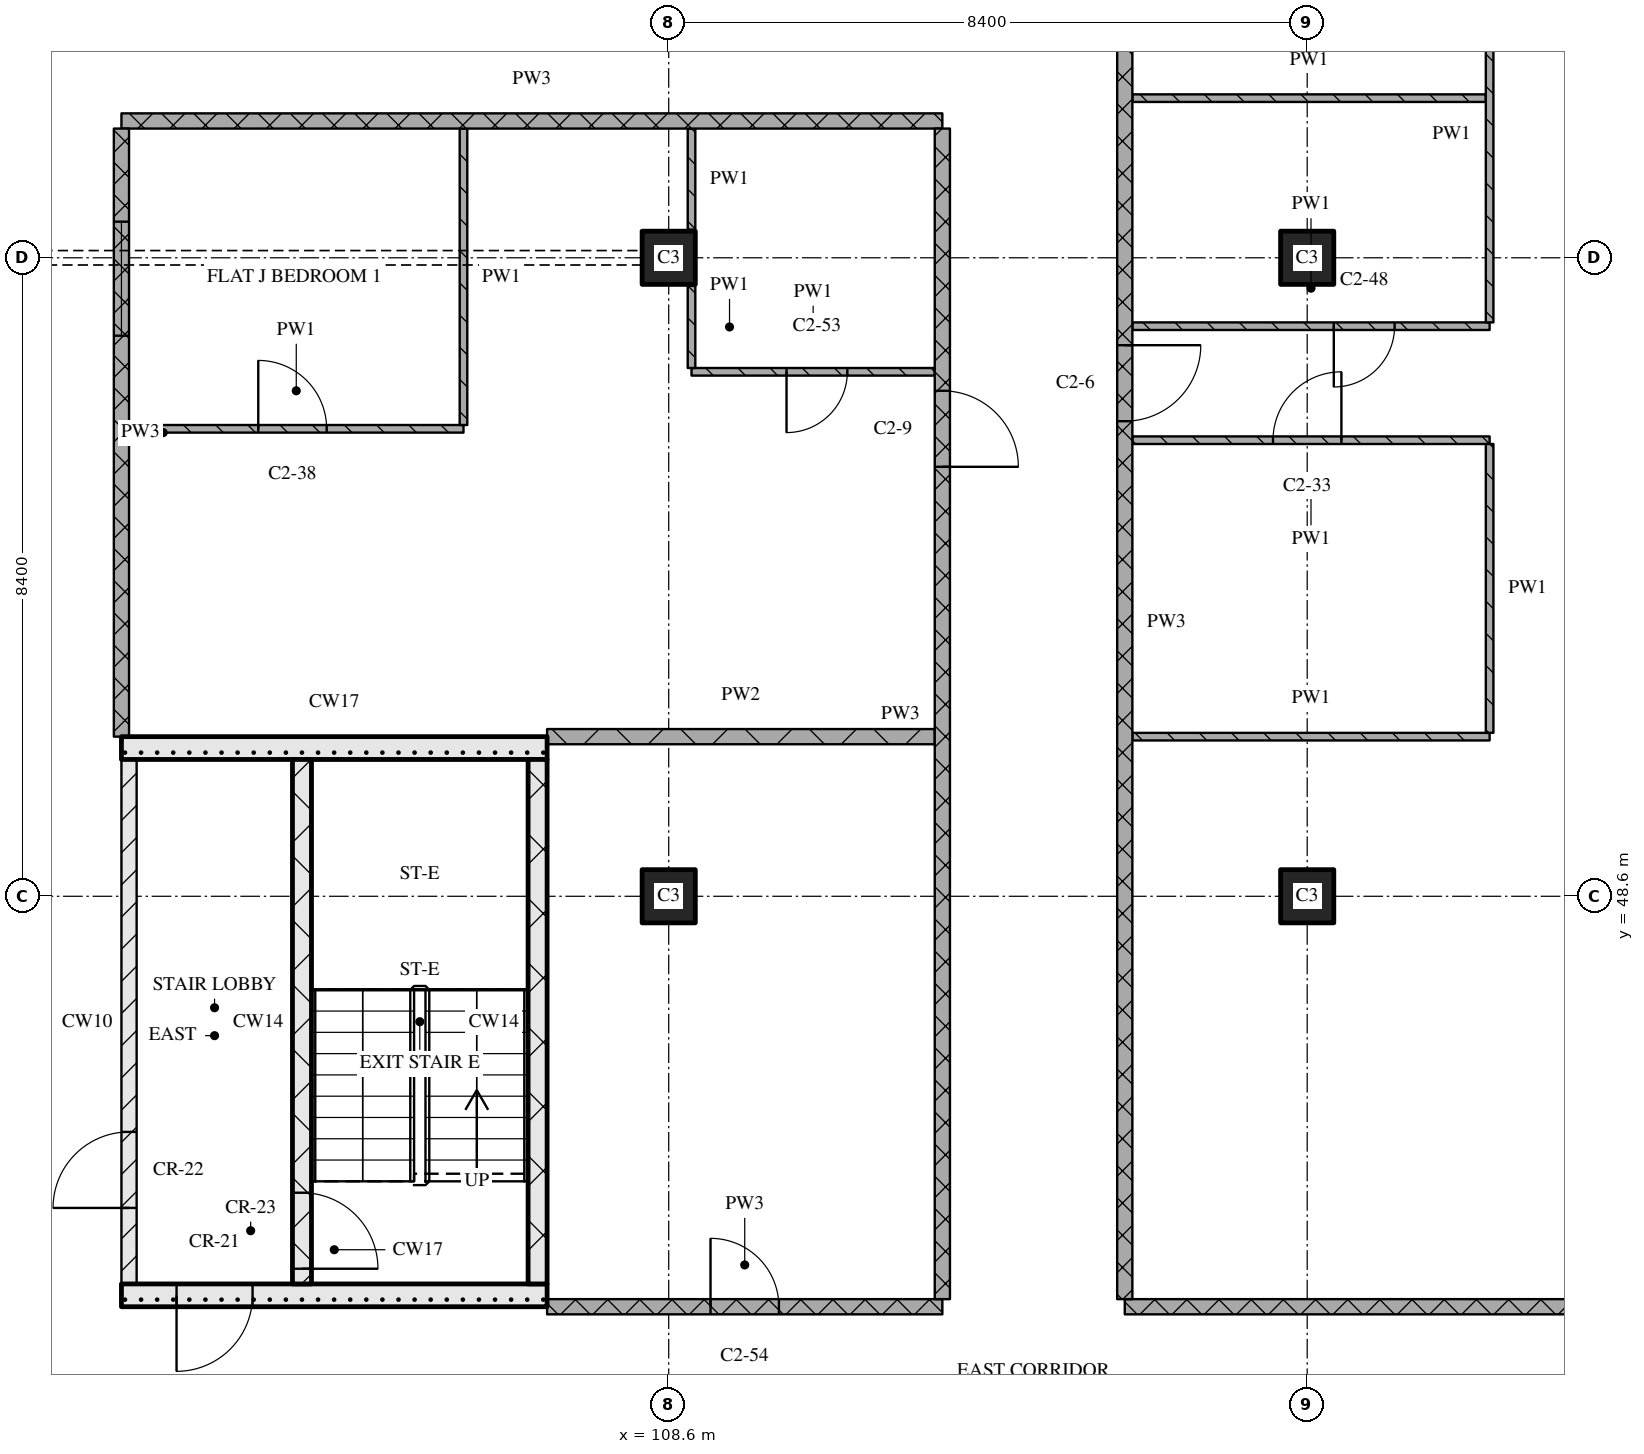
"""IFC4 building model, lengths in metres.
Left out: names, types, materials, properties, quantities, classifications, styles, units other than length and angle.
Written with IfcOpenShell. Run it as: python <this file> out.ifc"""

import sys

from ifc_helpers import new_model, si_unit, direction, frame, frame_2d, origin, origin_2d, place, context, subcontext, project, spatial, rectangle, extrude, element, fill, save


model = new_model("IFC4")
c1 = context("Model", 3, precision=1e-05, world=origin(), true_north=direction((0.0, 1.0)))
c2 = subcontext(c1, "Body", "Model", "MODEL_VIEW")
j1 = project(units=[si_unit("LENGTHUNIT", "METRE"), si_unit("PLANEANGLEUNIT", "RADIAN")], contexts=[c1])
p1 = place(None, origin())
s1 = spatial("IfcSite", under=j1, at=p1, CompositionType="ELEMENT")
p2 = place(p1, origin())
s2 = spatial("IfcBuilding", under=s1, at=p2, CompositionType="ELEMENT")
p3 = place(p2, frame((0.0, 0.0, 165.45)))
s3 = spatial("IfcBuildingStorey", under=s2, at=p3, CompositionType="ELEMENT", Elevation=165.45)
for number, where, z_axis, x_axis in (
    (1, (108.6, 48.6, 0.0), (0.0, 0.0, 1.0), (1.0, 0.0, 0.0)),
    (2, (108.6, 57.0, 0.0), (0.0, 0.0, 1.0), (1.0, 0.0, 0.0)),
    (3, (117.0, 48.6, 0.0), (0.0, 0.0, 1.0), (1.0, 0.0, 0.0)),
    (4, (117.0, 57.0, 0.0), (0.0, 0.0, 1.0), (1.0, 0.0, 0.0)),
):
    element("IfcColumn", number, at=place(p3, frame(where, z_axis=z_axis, x_axis=x_axis)), inside=s3, PredefinedType="COLUMN", context=c2, shape_type="SweptSolid", body=[
        extrude(rectangle(XDim=0.7, YDim=0.7, at=origin_2d()), origin(), (0.0, 0.0, 1.0), 3.6),
    ])
p4 = place(p3, frame((101.4, 43.35, 0.0), z_axis=(0.0, 0.0, 1.0), x_axis=(1.0, 0.0, 0.0)))
e5 = element("IfcWall", 5, at=p4, inside=s3, PredefinedType="SOLIDWALL", context=c2, shape_type="SweptSolid", body=[
    extrude(rectangle(XDim=5.6, YDim=0.3, at=frame_2d((2.8, 0.0))), origin(), (0.0, 0.0, 1.0), 3.32),
])
p5 = place(p4, frame((0.725, 0.0, 0.0)))
e6 = element("IfcOpeningElement", 6, at=p5, cuts=e5, PredefinedType="OPENING", context=c2, shape_type="SweptSolid", body=[
    extrude(rectangle(XDim=1.0, YDim=2.1, at=frame_2d((0.5, 1.05))), frame((0.0, 0.16, 0.0), z_axis=(0.0, -1.0, 0.0), x_axis=(1.0, 0.0, 0.0)), (0.0, 0.0, 1.0), 0.32),
])
p6 = place(p3, frame((101.5, 43.5, 0.0), z_axis=(0.0, 0.0, 1.0), x_axis=(0.0, 1.0, 0.0)))
e7 = element("IfcWall", 7, at=p6, inside=s3, PredefinedType="PARTITIONING", context=c2, shape_type="SweptSolid", body=[
    extrude(rectangle(XDim=6.9, YDim=0.2, at=frame_2d((3.45, 0.0))), origin(), (0.0, 0.0, 1.0), 3.32),
])
p7 = place(p6, frame((1.0, 0.0, 0.0)))
e8 = element("IfcOpeningElement", 8, at=p7, cuts=e7, PredefinedType="OPENING", context=c2, shape_type="SweptSolid", body=[
    extrude(rectangle(XDim=1.0, YDim=2.1, at=frame_2d((0.5, 1.05))), frame((0.0, 0.11, 0.0), z_axis=(0.0, -1.0, 0.0), x_axis=(1.0, 0.0, 0.0)), (0.0, 0.0, 1.0), 0.22),
])
p8 = place(p3, frame((103.775, 43.5, 0.0), z_axis=(0.0, 0.0, 1.0), x_axis=(0.0, 1.0, 0.0)))
e9 = element("IfcWall", 9, at=p8, inside=s3, PredefinedType="SOLIDWALL", context=c2, shape_type="SweptSolid", body=[
    extrude(rectangle(XDim=6.9, YDim=0.25, at=frame_2d((3.45, 0.0))), origin(), (0.0, 0.0, 1.0), 3.32),
])
p9 = place(p8, frame((0.2, 0.0, 0.0)))
e10 = element("IfcOpeningElement", 10, at=p9, cuts=e9, PredefinedType="OPENING", context=c2, shape_type="SweptSolid", body=[
    extrude(rectangle(XDim=1.0, YDim=2.1, at=frame_2d((0.5, 1.05))), frame((0.0, 0.135, 0.0), z_axis=(0.0, -1.0, 0.0), x_axis=(1.0, 0.0, 0.0)), (0.0, 0.0, 1.0), 0.27),
])
p10 = place(p3, frame((106.875, 43.5, 0.0), z_axis=(0.0, 0.0, 1.0), x_axis=(0.0, 1.0, 0.0)))
e11 = element("IfcWall", 11, at=p10, inside=s3, PredefinedType="SOLIDWALL", context=c2, shape_type="SweptSolid", body=[
    extrude(rectangle(XDim=6.9, YDim=0.25, at=frame_2d((3.45, 0.0))), origin(), (0.0, 0.0, 1.0), 3.32),
])
p11 = place(p3, frame((101.4, 50.55, 0.0), z_axis=(0.0, 0.0, 1.0), x_axis=(1.0, 0.0, 0.0)))
e12 = element("IfcWall", 12, at=p11, inside=s3, PredefinedType="SOLIDWALL", context=c2, shape_type="SweptSolid", body=[
    extrude(rectangle(XDim=5.6, YDim=0.3, at=frame_2d((2.8, 0.0))), origin(), (0.0, 0.0, 1.0), 3.32),
])
p12 = place(p3, frame((107.0, 43.2, 0.0), z_axis=(0.0, 0.0, 1.0), x_axis=(1.0, 0.0, 0.0)))
e13 = element("IfcWall", 13, at=p12, inside=s3, PredefinedType="PARTITIONING", context=c2, shape_type="SweptSolid", body=[
    extrude(rectangle(XDim=5.2, YDim=0.2, at=frame_2d((2.6, 0.0))), origin(), (0.0, 0.0, 1.0), 3.32),
])
p13 = place(p12, frame((2.15, 0.0, 0.0)))
e14 = element("IfcOpeningElement", 14, at=p13, cuts=e13, PredefinedType="OPENING", context=c2, shape_type="SweptSolid", body=[
    extrude(rectangle(XDim=0.9, YDim=2.1, at=frame_2d((0.45, 1.05))), frame((0.0, 0.11, 0.0), z_axis=(0.0, -1.0, 0.0), x_axis=(1.0, 0.0, 0.0)), (0.0, 0.0, 1.0), 0.22),
])
p14 = place(p3, frame((114.6, 43.2, 0.0), z_axis=(0.0, 0.0, 1.0), x_axis=(1.0, 0.0, 0.0)))
e15 = element("IfcWall", 15, at=p14, inside=s3, PredefinedType="PARTITIONING", context=c2, shape_type="SweptSolid", body=[
    extrude(rectangle(XDim=12.32, YDim=0.2, at=frame_2d((6.16, 0.0))), origin(), (0.0, 0.0, 1.0), 3.32),
])
p15 = place(p3, frame((107.0, 50.7, 0.0), z_axis=(0.0, 0.0, 1.0), x_axis=(1.0, 0.0, 0.0)))
e16 = element("IfcWall", 16, at=p15, inside=s3, PredefinedType="PARTITIONING", context=c2, shape_type="SweptSolid", body=[
    extrude(rectangle(XDim=5.1, YDim=0.2, at=frame_2d((2.55, 0.0))), origin(), (0.0, 0.0, 1.0), 3.32),
])
p16 = place(p3, frame((114.7, 50.7, 0.0), z_axis=(0.0, 0.0, 1.0), x_axis=(1.0, 0.0, 0.0)))
e17 = element("IfcWall", 17, at=p16, inside=s3, PredefinedType="PARTITIONING", context=c2, shape_type="SweptSolid", body=[
    extrude(rectangle(XDim=4.7, YDim=0.1, at=frame_2d((2.35, 0.0))), origin(), (0.0, 0.0, 1.0), 3.32),
])
p17 = place(p3, frame((119.4, 54.6, 0.0), z_axis=(0.0, 0.0, 1.0), x_axis=(-1.0, 0.0, 0.0)))
e18 = element("IfcWall", 18, at=p17, inside=s3, PredefinedType="PARTITIONING", context=c2, shape_type="SweptSolid", body=[
    extrude(rectangle(XDim=4.7, YDim=0.1, at=frame_2d((2.35, 0.0))), origin(), (0.0, 0.0, 1.0), 3.32),
])
p18 = place(p17, frame((1.95, 0.0, 0.0)))
e19 = element("IfcOpeningElement", 19, at=p18, cuts=e18, PredefinedType="OPENING", context=c2, shape_type="SweptSolid", body=[
    extrude(rectangle(XDim=0.9, YDim=2.1, at=frame_2d((0.45, 1.05))), frame((0.0, 0.06, 0.0), z_axis=(0.0, -1.0, 0.0), x_axis=(1.0, 0.0, 0.0)), (0.0, 0.0, 1.0), 0.12),
])
p19 = place(p3, frame((101.5, 54.75, 0.0), z_axis=(0.0, 0.0, 1.0), x_axis=(1.0, 0.0, 0.0)))
e20 = element("IfcWall", 20, at=p19, inside=s3, PredefinedType="PARTITIONING", context=c2, shape_type="SweptSolid", body=[
    extrude(rectangle(XDim=4.4, YDim=0.1, at=frame_2d((2.2, 0.0))), origin(), (0.0, 0.0, 1.0), 3.32),
])
p20 = place(p19, frame((1.7, 0.0, 0.0)))
e21 = element("IfcOpeningElement", 21, at=p20, cuts=e20, PredefinedType="OPENING", context=c2, shape_type="SweptSolid", body=[
    extrude(rectangle(XDim=0.9, YDim=2.1, at=frame_2d((0.45, 1.05))), frame((0.0, 0.06, 0.0), z_axis=(0.0, -1.0, 0.0), x_axis=(1.0, 0.0, 0.0)), (0.0, 0.0, 1.0), 0.12),
])
p21 = place(p3, frame((108.9, 55.5, 0.0), z_axis=(0.0, 0.0, 1.0), x_axis=(1.0, 0.0, 0.0)))
e22 = element("IfcWall", 22, at=p21, inside=s3, PredefinedType="PARTITIONING", context=c2, shape_type="SweptSolid", body=[
    extrude(rectangle(XDim=3.2, YDim=0.1, at=frame_2d((1.6, 0.0))), origin(), (0.0, 0.0, 1.0), 3.32),
])
p22 = place(p21, frame((1.25, 0.0, 0.0)))
e23 = element("IfcOpeningElement", 23, at=p22, cuts=e22, PredefinedType="OPENING", context=c2, shape_type="SweptSolid", body=[
    extrude(rectangle(XDim=0.8, YDim=2.1, at=frame_2d((0.4, 1.05))), frame((0.0, 0.06, 0.0), z_axis=(0.0, -1.0, 0.0), x_axis=(1.0, 0.0, 0.0)), (0.0, 0.0, 1.0), 0.12),
])
p23 = place(p3, frame((114.7, 56.1, 0.0), z_axis=(0.0, 0.0, 1.0), x_axis=(1.0, 0.0, 0.0)))
e24 = element("IfcWall", 24, at=p23, inside=s3, PredefinedType="PARTITIONING", context=c2, shape_type="SweptSolid", body=[
    extrude(rectangle(XDim=4.7, YDim=0.1, at=frame_2d((2.35, 0.0))), origin(), (0.0, 0.0, 1.0), 3.32),
])
p24 = place(p23, frame((2.65, 0.0, 0.0)))
e25 = element("IfcOpeningElement", 25, at=p24, cuts=e24, PredefinedType="OPENING", context=c2, shape_type="SweptSolid", body=[
    extrude(rectangle(XDim=0.8, YDim=2.1, at=frame_2d((0.4, 1.05))), frame((0.0, 0.06, 0.0), z_axis=(0.0, -1.0, 0.0), x_axis=(1.0, 0.0, 0.0)), (0.0, 0.0, 1.0), 0.12),
])
p25 = place(p3, frame((101.4, 58.8, 0.0), z_axis=(0.0, 0.0, 1.0), x_axis=(1.0, 0.0, 0.0)))
e26 = element("IfcWall", 26, at=p25, inside=s3, PredefinedType="PARTITIONING", context=c2, shape_type="SweptSolid", body=[
    extrude(rectangle(XDim=10.8, YDim=0.2, at=frame_2d((5.4, 0.0))), origin(), (0.0, 0.0, 1.0), 3.32),
])
p26 = place(p3, frame((114.7, 59.1, 0.0), z_axis=(0.0, 0.0, 1.0), x_axis=(1.0, 0.0, 0.0)))
e27 = element("IfcWall", 27, at=p26, inside=s3, PredefinedType="PARTITIONING", context=c2, shape_type="SweptSolid", body=[
    extrude(rectangle(XDim=4.65, YDim=0.1, at=frame_2d((2.325, 0.0))), origin(), (0.0, 0.0, 1.0), 3.32),
])
p27 = place(p3, frame((101.4, 58.7, 0.0), z_axis=(0.0, 0.0, 1.0), x_axis=(0.0, -1.0, 0.0)))
e28 = element("IfcWall", 28, at=p27, inside=s3, PredefinedType="PARTITIONING", context=c2, shape_type="SweptSolid", body=[
    extrude(rectangle(XDim=8.0, YDim=0.2, at=frame_2d((4.0, 0.0))), origin(), (0.0, 0.0, 1.0), 3.32),
])
p28 = place(p27, frame((1.225, 0.0, 0.9)))
e29 = element("IfcOpeningElement", 29, at=p28, cuts=e28, PredefinedType="OPENING", context=c2, shape_type="SweptSolid", body=[
    extrude(rectangle(XDim=1.5, YDim=1.5, at=frame_2d((0.75, 0.75))), frame((0.0, 0.11, 0.0), z_axis=(0.0, -1.0, 0.0), x_axis=(1.0, 0.0, 0.0)), (0.0, 0.0, 1.0), 0.22),
])
p29 = place(p3, frame((105.9, 58.7, 0.0), z_axis=(0.0, 0.0, 1.0), x_axis=(0.0, -1.0, 0.0)))
e30 = element("IfcWall", 30, at=p29, inside=s3, PredefinedType="PARTITIONING", context=c2, shape_type="SweptSolid", body=[
    extrude(rectangle(XDim=3.9, YDim=0.1, at=frame_2d((1.95, 0.0))), origin(), (0.0, 0.0, 1.0), 3.32),
])
p30 = place(p3, frame((108.9, 56.63, 0.0), z_axis=(0.0, 0.0, 1.0), x_axis=(0.0, -1.0, 0.0)))
e31 = element("IfcWall", 31, at=p30, inside=s3, PredefinedType="PARTITIONING", context=c2, shape_type="SweptSolid", body=[
    extrude(rectangle(XDim=1.08, YDim=0.1, at=frame_2d((0.54, 0.0))), origin(), (0.0, 0.0, 1.0), 3.32),
])
p31 = place(p3, frame((108.9, 58.7, 0.0), z_axis=(0.0, 0.0, 1.0), x_axis=(0.0, -1.0, 0.0)))
e32 = element("IfcWall", 32, at=p31, inside=s3, PredefinedType="PARTITIONING", context=c2, shape_type="SweptSolid", body=[
    extrude(rectangle(XDim=1.33, YDim=0.1, at=frame_2d((0.665, 0.0))), origin(), (0.0, 0.0, 1.0), 3.32),
])
p32 = place(p3, frame((112.2, 43.3, 0.0), z_axis=(0.0, 0.0, 1.0), x_axis=(0.0, 1.0, 0.0)))
e33 = element("IfcWall", 33, at=p32, inside=s3, PredefinedType="PARTITIONING", context=c2, shape_type="SweptSolid", body=[
    extrude(rectangle(XDim=15.4, YDim=0.2, at=frame_2d((7.7, 0.0))), origin(), (0.0, 0.0, 1.0), 3.32),
])
p33 = place(p32, frame((10.95, 0.0, 0.0)))
e34 = element("IfcOpeningElement", 34, at=p33, cuts=e33, PredefinedType="OPENING", context=c2, shape_type="SweptSolid", body=[
    extrude(rectangle(XDim=1.0, YDim=2.1, at=frame_2d((0.5, 1.05))), frame((0.0, 0.11, 0.0), z_axis=(0.0, -1.0, 0.0), x_axis=(1.0, 0.0, 0.0)), (0.0, 0.0, 1.0), 0.22),
])
p34 = place(p3, frame((114.6, 61.1, 0.0), z_axis=(0.0, 0.0, 1.0), x_axis=(0.0, -1.0, 0.0)))
e35 = element("IfcWall", 35, at=p34, inside=s3, PredefinedType="PARTITIONING", context=c2, shape_type="SweptSolid", body=[
    extrude(rectangle(XDim=17.8, YDim=0.2, at=frame_2d((8.9, 0.0))), origin(), (0.0, 0.0, 1.0), 3.32),
])
p35 = place(p34, frame((5.25, 0.0, 0.0)))
e36 = element("IfcOpeningElement", 36, at=p35, cuts=e35, PredefinedType="OPENING", context=c2, shape_type="SweptSolid", body=[
    extrude(rectangle(XDim=1.0, YDim=2.1, at=frame_2d((0.5, 1.05))), frame((0.0, 0.11, 0.0), z_axis=(0.0, -1.0, 0.0), x_axis=(1.0, 0.0, 0.0)), (0.0, 0.0, 1.0), 0.22),
])
p36 = place(p3, frame((119.4, 54.55, 0.0), z_axis=(0.0, 0.0, 1.0), x_axis=(0.0, -1.0, 0.0)))
e37 = element("IfcWall", 37, at=p36, inside=s3, PredefinedType="PARTITIONING", context=c2, shape_type="SweptSolid", body=[
    extrude(rectangle(XDim=3.8, YDim=0.1, at=frame_2d((1.9, 0.0))), origin(), (0.0, 0.0, 1.0), 3.32),
])
p37 = place(p3, frame((119.4, 56.15, 0.0), z_axis=(0.0, 0.0, 1.0), x_axis=(0.0, 1.0, 0.0)))
e38 = element("IfcWall", 38, at=p37, inside=s3, PredefinedType="PARTITIONING", context=c2, shape_type="SweptSolid", body=[
    extrude(rectangle(XDim=4.95, YDim=0.1, at=frame_2d((2.475, 0.0))), origin(), (0.0, 0.0, 1.0), 3.32),
])
p38 = place(p37, frame((3.6, 0.0, 0.0)))
e39 = element("IfcOpeningElement", 39, at=p38, cuts=e38, PredefinedType="OPENING", context=c2, shape_type="SweptSolid", body=[
    extrude(rectangle(XDim=0.8, YDim=2.1, at=frame_2d((0.4, 1.05))), frame((0.0, 0.06, 0.0), z_axis=(0.0, -1.0, 0.0), x_axis=(1.0, 0.0, 0.0)), (0.0, 0.0, 1.0), 0.12),
])
p39 = place(p5, origin())
e40 = element("IfcDoor", 40, at=p39, inside=s3, OperationType="SINGLE_SWING_RIGHT", PredefinedType="DOOR", context=c2, shape_type="SweptSolid", body=[
    extrude(rectangle(XDim=1.0, YDim=2.1, at=frame_2d((0.5, 1.05))), frame((0.0, 0.025, 0.0), z_axis=(0.0, -1.0, 0.0), x_axis=(1.0, 0.0, 0.0)), (0.0, 0.0, 1.0), 0.05),
])
fill(e6, e40)
p40 = place(p9, origin())
e41 = element("IfcDoor", 41, at=p40, inside=s3, OperationType="SINGLE_SWING_RIGHT", PredefinedType="DOOR", context=c2, shape_type="SweptSolid", body=[
    extrude(rectangle(XDim=1.0, YDim=2.1, at=frame_2d((0.5, 1.05))), frame((0.0, 0.025, 0.0), z_axis=(0.0, -1.0, 0.0), x_axis=(1.0, 0.0, 0.0)), (0.0, 0.0, 1.0), 0.05),
])
fill(e10, e41)
p41 = place(p7, origin())
e42 = element("IfcDoor", 42, at=p41, inside=s3, OperationType="SINGLE_SWING_LEFT", PredefinedType="DOOR", context=c2, shape_type="SweptSolid", body=[
    extrude(rectangle(XDim=1.0, YDim=2.1, at=frame_2d((0.5, 1.05))), frame((0.0, 0.025, 0.0), z_axis=(0.0, -1.0, 0.0), x_axis=(1.0, 0.0, 0.0)), (0.0, 0.0, 1.0), 0.05),
])
fill(e8, e42)
p42 = place(p13, origin())
e43 = element("IfcDoor", 43, at=p42, inside=s3, OperationType="SINGLE_SWING_LEFT", PredefinedType="DOOR", context=c2, shape_type="SweptSolid", body=[
    extrude(rectangle(XDim=0.9, YDim=2.1, at=frame_2d((0.45, 1.05))), frame((0.0, 0.025, 0.0), z_axis=(0.0, -1.0, 0.0), x_axis=(1.0, 0.0, 0.0)), (0.0, 0.0, 1.0), 0.05),
])
fill(e14, e43)
p43 = place(p18, origin())
e44 = element("IfcDoor", 44, at=p43, inside=s3, OperationType="SINGLE_SWING_RIGHT", PredefinedType="DOOR", context=c2, shape_type="SweptSolid", body=[
    extrude(rectangle(XDim=0.9, YDim=2.1, at=frame_2d((0.45, 1.05))), frame((0.0, 0.025, 0.0), z_axis=(0.0, -1.0, 0.0), x_axis=(1.0, 0.0, 0.0)), (0.0, 0.0, 1.0), 0.05),
])
fill(e19, e44)
p44 = place(p20, origin())
e45 = element("IfcDoor", 45, at=p44, inside=s3, OperationType="SINGLE_SWING_LEFT", PredefinedType="DOOR", context=c2, shape_type="SweptSolid", body=[
    extrude(rectangle(XDim=0.9, YDim=2.1, at=frame_2d((0.45, 1.05))), frame((0.0, 0.025, 0.0), z_axis=(0.0, -1.0, 0.0), x_axis=(1.0, 0.0, 0.0)), (0.0, 0.0, 1.0), 0.05),
])
fill(e21, e45)
p45 = place(p22, origin())
e46 = element("IfcDoor", 46, at=p45, inside=s3, OperationType="SINGLE_SWING_RIGHT", PredefinedType="DOOR", context=c2, shape_type="SweptSolid", body=[
    extrude(rectangle(XDim=0.8, YDim=2.1, at=frame_2d((0.4, 1.05))), frame((0.0, 0.025, 0.0), z_axis=(0.0, -1.0, 0.0), x_axis=(1.0, 0.0, 0.0)), (0.0, 0.0, 1.0), 0.05),
])
fill(e23, e46)
p46 = place(p24, origin())
e47 = element("IfcDoor", 47, at=p46, inside=s3, OperationType="SINGLE_SWING_RIGHT", PredefinedType="DOOR", context=c2, shape_type="SweptSolid", body=[
    extrude(rectangle(XDim=0.8, YDim=2.1, at=frame_2d((0.4, 1.05))), frame((0.0, 0.025, 0.0), z_axis=(0.0, -1.0, 0.0), x_axis=(1.0, 0.0, 0.0)), (0.0, 0.0, 1.0), 0.05),
])
fill(e25, e47)
p47 = place(p33, origin())
e48 = element("IfcDoor", 48, at=p47, inside=s3, OperationType="SINGLE_SWING_RIGHT", PredefinedType="DOOR", context=c2, shape_type="SweptSolid", body=[
    extrude(rectangle(XDim=1.0, YDim=2.1, at=frame_2d((0.5, 1.05))), frame((0.0, 0.025, 0.0), z_axis=(0.0, -1.0, 0.0), x_axis=(1.0, 0.0, 0.0)), (0.0, 0.0, 1.0), 0.05),
])
fill(e34, e48)
p48 = place(p35, origin())
e49 = element("IfcDoor", 49, at=p48, inside=s3, OperationType="SINGLE_SWING_LEFT", PredefinedType="DOOR", context=c2, shape_type="SweptSolid", body=[
    extrude(rectangle(XDim=1.0, YDim=2.1, at=frame_2d((0.5, 1.05))), frame((0.0, 0.025, 0.0), z_axis=(0.0, -1.0, 0.0), x_axis=(1.0, 0.0, 0.0)), (0.0, 0.0, 1.0), 0.05),
])
fill(e36, e49)
p49 = place(p28, origin())
e50 = element("IfcWindow", 50, at=p49, inside=s3, PartitioningType="SINGLE_PANEL", PredefinedType="WINDOW", context=c2, shape_type="SweptSolid", body=[
    extrude(rectangle(XDim=1.5, YDim=1.5, at=frame_2d((0.75, 0.75))), frame((0.0, 0.03, 0.0), z_axis=(0.0, -1.0, 0.0), x_axis=(1.0, 0.0, 0.0)), (0.0, 0.0, 1.0), 0.06),
])
fill(e29, e50)
save(model, sys.argv[1])
